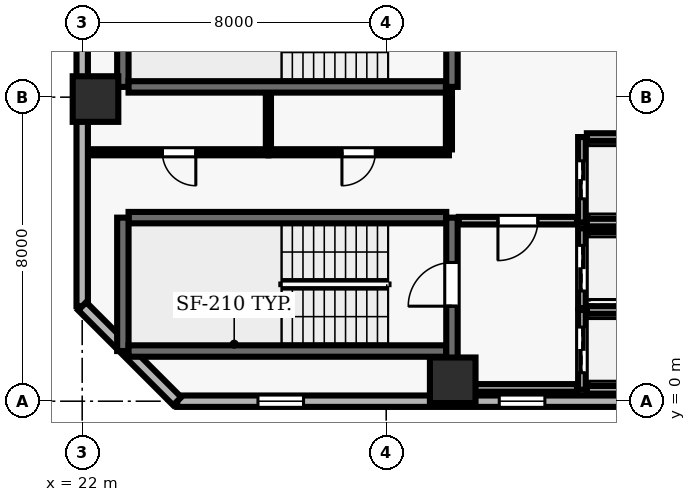
"""IFC4 building model, lengths in metres.
Left out: names, types, materials, properties, quantities, classifications, styles, units other than length and angle.
Written with IfcOpenShell. Run it as: python <this file> out.ifc"""

import sys

from ifc_helpers import new_model, si_unit, direction, frame, frame_2d, origin, origin_2d, place, context, subcontext, project, spatial, rectangle, extrude, element, fill, save


model = new_model("IFC4")
c1 = context("Model", 3, precision=1e-05, world=origin(), true_north=direction((0.0, 1.0)))
c2 = subcontext(c1, "Body", "Model", "MODEL_VIEW")
j1 = project(units=[si_unit("LENGTHUNIT", "METRE"), si_unit("PLANEANGLEUNIT", "RADIAN")], contexts=[c1])
p1 = place(None, origin())
s1 = spatial("IfcSite", under=j1, at=p1, CompositionType="ELEMENT")
p2 = place(p1, origin())
s2 = spatial("IfcBuilding", under=s1, at=p2, CompositionType="ELEMENT")
p3 = place(p2, frame((0.0, 0.0, 103.4)))
s3 = spatial("IfcBuildingStorey", under=s2, at=p3, CompositionType="ELEMENT", Elevation=103.4)
for number, where, z_axis, x_axis in (
    (1, (31.75, 0.55, 0.0), (0.0, 0.0, 1.0), (1.0, 0.0, 0.0)),
    (2, (22.35, 7.95, 0.0), (0.0, 0.0, 1.0), (1.0, 0.0, 0.0)),
):
    element("IfcColumn", number, at=place(p3, frame(where, z_axis=z_axis, x_axis=x_axis)), inside=s3, PredefinedType="COLUMN", context=c2, shape_type="SweptSolid", body=[
        extrude(rectangle(XDim=1.2, YDim=1.2, at=origin_2d()), origin(), (0.0, 0.0, 1.0), 3.9),
    ])
p4 = place(p3, frame((24.5, 0.0, 0.0), z_axis=(0.0, 0.0, 1.0), x_axis=(1.0, 0.0, 0.0)))
e3 = element("IfcWall", 3, at=p4, inside=s3, PredefinedType="SOLIDWALL", context=c2, shape_type="SweptSolid", body=[
    extrude(rectangle(XDim=43.6, YDim=0.3, at=frame_2d((21.8, 0.0))), origin(), (0.0, 0.0, 1.0), 3.69),
])
p5 = place(p4, frame((2.125, 0.0, 0.9)))
e4 = element("IfcOpeningElement", 4, at=p5, cuts=e3, PredefinedType="OPENING", context=c2, shape_type="SweptSolid", body=[
    extrude(rectangle(XDim=1.2, YDim=1.6, at=frame_2d((0.6, 0.8))), frame((0.0, 0.16, 0.0), z_axis=(0.0, -1.0, 0.0), x_axis=(1.0, 0.0, 0.0)), (0.0, 0.0, 1.0), 0.32),
])
p6 = place(p4, frame((8.475, 0.0, 0.9)))
e5 = element("IfcOpeningElement", 5, at=p6, cuts=e3, PredefinedType="OPENING", context=c2, shape_type="SweptSolid", body=[
    extrude(rectangle(XDim=1.2, YDim=1.6, at=frame_2d((0.6, 0.8))), frame((0.0, 0.16, 0.0), z_axis=(0.0, -1.0, 0.0), x_axis=(1.0, 0.0, 0.0)), (0.0, 0.0, 1.0), 0.32),
])
p7 = place(p4, frame((18.475, 0.0, 0.9)))
e6 = element("IfcOpeningElement", 6, at=p7, cuts=e3, PredefinedType="OPENING", context=c2, shape_type="SweptSolid", body=[
    extrude(rectangle(XDim=1.2, YDim=1.6, at=frame_2d((0.6, 0.8))), frame((0.0, 0.16, 0.0), z_axis=(0.0, -1.0, 0.0), x_axis=(1.0, 0.0, 0.0)), (0.0, 0.0, 1.0), 0.32),
])
p8 = place(p4, frame((23.925, 0.0, 0.9)))
e7 = element("IfcOpeningElement", 7, at=p8, cuts=e3, PredefinedType="OPENING", context=c2, shape_type="SweptSolid", body=[
    extrude(rectangle(XDim=1.2, YDim=1.6, at=frame_2d((0.6, 0.8))), frame((0.0, 0.16, 0.0), z_axis=(0.0, -1.0, 0.0), x_axis=(1.0, 0.0, 0.0)), (0.0, 0.0, 1.0), 0.32),
])
p9 = place(p4, frame((29.375, 0.0, 0.9)))
e8 = element("IfcOpeningElement", 8, at=p9, cuts=e3, PredefinedType="OPENING", context=c2, shape_type="SweptSolid", body=[
    extrude(rectangle(XDim=1.2, YDim=1.6, at=frame_2d((0.6, 0.8))), frame((0.0, 0.16, 0.0), z_axis=(0.0, -1.0, 0.0), x_axis=(1.0, 0.0, 0.0)), (0.0, 0.0, 1.0), 0.32),
])
p10 = place(p4, frame((33.925, 0.0, 0.9)))
e9 = element("IfcOpeningElement", 9, at=p10, cuts=e3, PredefinedType="OPENING", context=c2, shape_type="SweptSolid", body=[
    extrude(rectangle(XDim=1.2, YDim=1.6, at=frame_2d((0.6, 0.8))), frame((0.0, 0.16, 0.0), z_axis=(0.0, -1.0, 0.0), x_axis=(1.0, 0.0, 0.0)), (0.0, 0.0, 1.0), 0.32),
])
p11 = place(p4, frame((40.275, 0.0, 0.9)))
e10 = element("IfcOpeningElement", 10, at=p11, cuts=e3, PredefinedType="OPENING", context=c2, shape_type="SweptSolid", body=[
    extrude(rectangle(XDim=1.2, YDim=1.6, at=frame_2d((0.6, 0.8))), frame((0.0, 0.16, 0.0), z_axis=(0.0, -1.0, 0.0), x_axis=(1.0, 0.0, 0.0)), (0.0, 0.0, 1.0), 0.32),
])
p12 = place(p3, frame((22.0, 46.1, 0.0), z_axis=(0.0, 0.0, 1.0), x_axis=(0.0, -1.0, 0.0)))
e11 = element("IfcWall", 11, at=p12, inside=s3, PredefinedType="SOLIDWALL", context=c2, shape_type="SweptSolid", body=[
    extrude(rectangle(XDim=43.6, YDim=0.3, at=frame_2d((21.8, 0.0))), origin(), (0.0, 0.0, 1.0), 3.69),
])
p13 = place(p12, frame((7.1, 0.0, 0.0)))
e12 = element("IfcOpeningElement", 12, at=p13, cuts=e11, PredefinedType="OPENING", context=c2, shape_type="SweptSolid", body=[
    extrude(rectangle(XDim=1.0, YDim=2.2, at=frame_2d((0.5, 1.1))), frame((0.0, 0.16, 0.0), z_axis=(0.0, -1.0, 0.0), x_axis=(1.0, 0.0, 0.0)), (0.0, 0.0, 1.0), 0.32),
])
p14 = place(p12, frame((2.125, 0.0, 0.9)))
e13 = element("IfcOpeningElement", 13, at=p14, cuts=e11, PredefinedType="OPENING", context=c2, shape_type="SweptSolid", body=[
    extrude(rectangle(XDim=1.2, YDim=1.6, at=frame_2d((0.6, 0.8))), frame((0.0, 0.16, 0.0), z_axis=(0.0, -1.0, 0.0), x_axis=(1.0, 0.0, 0.0)), (0.0, 0.0, 1.0), 0.32),
])
p15 = place(p12, frame((8.475, 0.0, 0.9)))
e14 = element("IfcOpeningElement", 14, at=p15, cuts=e11, PredefinedType="OPENING", context=c2, shape_type="SweptSolid", body=[
    extrude(rectangle(XDim=1.2, YDim=1.6, at=frame_2d((0.6, 0.8))), frame((0.0, 0.16, 0.0), z_axis=(0.0, -1.0, 0.0), x_axis=(1.0, 0.0, 0.0)), (0.0, 0.0, 1.0), 0.32),
])
p16 = place(p12, frame((13.025, 0.0, 0.9)))
e15 = element("IfcOpeningElement", 15, at=p16, cuts=e11, PredefinedType="OPENING", context=c2, shape_type="SweptSolid", body=[
    extrude(rectangle(XDim=1.2, YDim=1.6, at=frame_2d((0.6, 0.8))), frame((0.0, 0.16, 0.0), z_axis=(0.0, -1.0, 0.0), x_axis=(1.0, 0.0, 0.0)), (0.0, 0.0, 1.0), 0.32),
])
p17 = place(p12, frame((18.025, 0.0, 0.9)))
e16 = element("IfcOpeningElement", 16, at=p17, cuts=e11, PredefinedType="OPENING", context=c2, shape_type="SweptSolid", body=[
    extrude(rectangle(XDim=1.2, YDim=1.6, at=frame_2d((0.6, 0.8))), frame((0.0, 0.16, 0.0), z_axis=(0.0, -1.0, 0.0), x_axis=(1.0, 0.0, 0.0)), (0.0, 0.0, 1.0), 0.32),
])
p18 = place(p12, frame((23.925, 0.0, 0.9)))
e17 = element("IfcOpeningElement", 17, at=p18, cuts=e11, PredefinedType="OPENING", context=c2, shape_type="SweptSolid", body=[
    extrude(rectangle(XDim=1.2, YDim=1.6, at=frame_2d((0.6, 0.8))), frame((0.0, 0.16, 0.0), z_axis=(0.0, -1.0, 0.0), x_axis=(1.0, 0.0, 0.0)), (0.0, 0.0, 1.0), 0.32),
])
p19 = place(p12, frame((29.375, 0.0, 0.9)))
e18 = element("IfcOpeningElement", 18, at=p19, cuts=e11, PredefinedType="OPENING", context=c2, shape_type="SweptSolid", body=[
    extrude(rectangle(XDim=1.2, YDim=1.6, at=frame_2d((0.6, 0.8))), frame((0.0, 0.16, 0.0), z_axis=(0.0, -1.0, 0.0), x_axis=(1.0, 0.0, 0.0)), (0.0, 0.0, 1.0), 0.32),
])
p20 = place(p12, frame((34.825, 0.0, 0.9)))
e19 = element("IfcOpeningElement", 19, at=p20, cuts=e11, PredefinedType="OPENING", context=c2, shape_type="SweptSolid", body=[
    extrude(rectangle(XDim=1.2, YDim=1.6, at=frame_2d((0.6, 0.8))), frame((0.0, 0.16, 0.0), z_axis=(0.0, -1.0, 0.0), x_axis=(1.0, 0.0, 0.0)), (0.0, 0.0, 1.0), 0.32),
])
p21 = place(p3, frame((22.0, 2.5, 0.0), z_axis=(0.0, 0.0, 1.0), x_axis=(0.707106781187, -0.707106781187, 0.0)))
e20 = element("IfcWall", 20, at=p21, inside=s3, PredefinedType="SOLIDWALL", context=c2, shape_type="SweptSolid", body=[
    extrude(rectangle(XDim=3.536, YDim=0.3, at=frame_2d((1.768, 0.0))), origin(), (0.0, 0.0, 1.0), 3.69),
])
p22 = place(p3, frame((31.58, 4.83, 0.0), z_axis=(0.0, 0.0, 1.0), x_axis=(-1.0, 0.0, 0.0)))
e21 = element("IfcWall", 21, at=p22, inside=s3, PredefinedType="SHEAR", context=c2, shape_type="SweptSolid", body=[
    extrude(rectangle(XDim=8.36, YDim=0.3, at=frame_2d((4.18, 0.0))), origin(), (0.0, 0.0, 1.0), 3.69),
])
p23 = place(p3, frame((23.07, 4.83, 0.0), z_axis=(0.0, 0.0, 1.0), x_axis=(0.0, -1.0, 0.0)))
e22 = element("IfcWall", 22, at=p23, inside=s3, PredefinedType="SHEAR", context=c2, shape_type="SweptSolid", body=[
    extrude(rectangle(XDim=3.51, YDim=0.3, at=frame_2d((1.755, 0.0))), origin(), (0.0, 0.0, 1.0), 3.69),
])
p24 = place(p3, frame((23.22, 1.32, 0.0), z_axis=(0.0, 0.0, 1.0), x_axis=(1.0, 0.0, 0.0)))
e23 = element("IfcWall", 23, at=p24, inside=s3, PredefinedType="SHEAR", context=c2, shape_type="SweptSolid", body=[
    extrude(rectangle(XDim=8.36, YDim=0.3, at=frame_2d((4.18, 0.0))), origin(), (0.0, 0.0, 1.0), 3.69),
])
p25 = place(p3, frame((31.73, 0.96, 0.0), z_axis=(0.0, 0.0, 1.0), x_axis=(0.0, 1.0, 0.0)))
e24 = element("IfcWall", 24, at=p25, inside=s3, PredefinedType="SHEAR", context=c2, shape_type="SweptSolid", body=[
    extrude(rectangle(XDim=3.87, YDim=0.3, at=frame_2d((1.935, 0.0))), origin(), (0.0, 0.0, 1.0), 3.69),
])
p26 = place(p25, frame((1.54, 0.0, 0.0)))
e25 = element("IfcOpeningElement", 25, at=p26, cuts=e24, PredefinedType="OPENING", context=c2, shape_type="SweptSolid", body=[
    extrude(rectangle(XDim=1.15, YDim=2.15, at=frame_2d((0.575, 1.075))), frame((0.0, 0.16, 0.0), z_axis=(0.0, -1.0, 0.0), x_axis=(1.0, 0.0, 0.0)), (0.0, 0.0, 1.0), 0.32),
])
p27 = place(p3, frame((23.07, 11.78, 0.0), z_axis=(0.0, 0.0, 1.0), x_axis=(0.0, -1.0, 0.0)))
e26 = element("IfcWall", 26, at=p27, inside=s3, PredefinedType="SHEAR", context=c2, shape_type="SweptSolid", body=[
    extrude(rectangle(XDim=3.51, YDim=0.3, at=frame_2d((1.755, 0.0))), origin(), (0.0, 0.0, 1.0), 3.69),
])
p28 = place(p3, frame((23.22, 8.27, 0.0), z_axis=(0.0, 0.0, 1.0), x_axis=(1.0, 0.0, 0.0)))
e27 = element("IfcWall", 27, at=p28, inside=s3, PredefinedType="SHEAR", context=c2, shape_type="SweptSolid", body=[
    extrude(rectangle(XDim=8.36, YDim=0.3, at=frame_2d((4.18, 0.0))), origin(), (0.0, 0.0, 1.0), 3.69),
])
p29 = place(p3, frame((31.73, 8.27, 0.0), z_axis=(0.0, 0.0, 1.0), x_axis=(0.0, 1.0, 0.0)))
e28 = element("IfcWall", 28, at=p29, inside=s3, PredefinedType="SHEAR", context=c2, shape_type="SweptSolid", body=[
    extrude(rectangle(XDim=3.51, YDim=0.3, at=frame_2d((1.755, 0.0))), origin(), (0.0, 0.0, 1.0), 3.69),
])
p30 = place(p29, frame((1.18, 0.0, 0.0)))
e29 = element("IfcOpeningElement", 29, at=p30, cuts=e28, PredefinedType="OPENING", context=c2, shape_type="SweptSolid", body=[
    extrude(rectangle(XDim=1.15, YDim=2.15, at=frame_2d((0.575, 1.075))), frame((0.0, 0.16, 0.0), z_axis=(0.0, -1.0, 0.0), x_axis=(1.0, 0.0, 0.0)), (0.0, 0.0, 1.0), 0.32),
])
p31 = place(p3, frame((35.15, 2.4, 0.0), z_axis=(0.0, 0.0, 1.0), x_axis=(0.0, -1.0, 0.0)))
e30 = element("IfcWall", 30, at=p31, inside=s3, PredefinedType="SOLIDWALL", context=c2, shape_type="SweptSolid", body=[
    extrude(rectangle(XDim=2.1, YDim=0.2, at=frame_2d((1.05, 0.0))), origin(), (0.0, 0.0, 1.0), 3.69),
])
p32 = place(p31, frame((0.45, 0.0, 0.0)))
e31 = element("IfcOpeningElement", 31, at=p32, cuts=e30, PredefinedType="OPENING", context=c2, shape_type="SweptSolid", body=[
    extrude(rectangle(XDim=1.2, YDim=2.15, at=frame_2d((0.6, 1.075))), frame((0.0, 0.11, 0.0), z_axis=(0.0, -1.0, 0.0), x_axis=(1.0, 0.0, 0.0)), (0.0, 0.0, 1.0), 0.22),
])
for number, where, z_axis, x_axis in (
    (32, (35.28, 0.3, 0.0), (0.0, 0.0, 1.0), (1.0, 0.0, 0.0)),
    (33, (37.42, 2.4, 0.0), (0.0, 0.0, 1.0), (-1.0, 0.0, 0.0)),
):
    element("IfcWall", number, at=place(p3, frame(where, z_axis=z_axis, x_axis=x_axis)), inside=s3, PredefinedType="SOLIDWALL", context=c2, shape_type="SweptSolid", body=[
        extrude(rectangle(XDim=2.14, YDim=0.2, at=frame_2d((1.07, 0.0))), origin(), (0.0, 0.0, 1.0), 3.69),
    ])
p33 = place(p3, frame((35.15, 4.55, 0.0), z_axis=(0.0, 0.0, 1.0), x_axis=(0.0, -1.0, 0.0)))
e34 = element("IfcWall", 34, at=p33, inside=s3, PredefinedType="SOLIDWALL", context=c2, shape_type="SweptSolid", body=[
    extrude(rectangle(XDim=2.1, YDim=0.2, at=frame_2d((1.05, 0.0))), origin(), (0.0, 0.0, 1.0), 3.69),
])
p34 = place(p33, frame((0.45, 0.0, 0.0)))
e35 = element("IfcOpeningElement", 35, at=p34, cuts=e34, PredefinedType="OPENING", context=c2, shape_type="SweptSolid", body=[
    extrude(rectangle(XDim=1.2, YDim=2.15, at=frame_2d((0.6, 1.075))), frame((0.0, 0.11, 0.0), z_axis=(0.0, -1.0, 0.0), x_axis=(1.0, 0.0, 0.0)), (0.0, 0.0, 1.0), 0.22),
])
p35 = place(p3, frame((37.42, 4.55, 0.0), z_axis=(0.0, 0.0, 1.0), x_axis=(-1.0, 0.0, 0.0)))
e36 = element("IfcWall", 36, at=p35, inside=s3, PredefinedType="SOLIDWALL", context=c2, shape_type="SweptSolid", body=[
    extrude(rectangle(XDim=2.14, YDim=0.2, at=frame_2d((1.07, 0.0))), origin(), (0.0, 0.0, 1.0), 3.69),
])
p36 = place(p3, frame((35.15, 6.95, 0.0), z_axis=(0.0, 0.0, 1.0), x_axis=(0.0, -1.0, 0.0)))
e37 = element("IfcWall", 37, at=p36, inside=s3, PredefinedType="SOLIDWALL", context=c2, shape_type="SweptSolid", body=[
    extrude(rectangle(XDim=2.25, YDim=0.2, at=frame_2d((1.125, 0.0))), origin(), (0.0, 0.0, 1.0), 3.69),
])
p37 = place(p36, frame((0.625, 0.0, 0.0)))
e38 = element("IfcOpeningElement", 38, at=p37, cuts=e37, PredefinedType="OPENING", context=c2, shape_type="SweptSolid", body=[
    extrude(rectangle(XDim=1.0, YDim=2.1, at=frame_2d((0.5, 1.05))), frame((0.0, 0.11, 0.0), z_axis=(0.0, -1.0, 0.0), x_axis=(1.0, 0.0, 0.0)), (0.0, 0.0, 1.0), 0.22),
])
for number, where, z_axis, x_axis in (
    (39, (35.28, 4.7, 0.0), (0.0, 0.0, 1.0), (1.0, 0.0, 0.0)),
    (40, (37.42, 6.95, 0.0), (0.0, 0.0, 1.0), (-1.0, 0.0, 0.0)),
):
    element("IfcWall", number, at=place(p3, frame(where, z_axis=z_axis, x_axis=x_axis)), inside=s3, PredefinedType="SOLIDWALL", context=c2, shape_type="SweptSolid", body=[
        extrude(rectangle(XDim=2.14, YDim=0.2, at=frame_2d((1.07, 0.0))), origin(), (0.0, 0.0, 1.0), 3.69),
    ])
p38 = place(p3, frame((26.9, 6.55, 0.0), z_axis=(0.0, 0.0, 1.0), x_axis=(-1.0, 0.0, 0.0)))
e41 = element("IfcWall", 41, at=p38, inside=s3, PredefinedType="PARTITIONING", context=c2, shape_type="SweptSolid", body=[
    extrude(rectangle(XDim=4.7, YDim=0.16, at=frame_2d((2.35, 0.0))), origin(), (0.0, 0.0, 1.0), 3.69),
])
p39 = place(p38, frame((1.91, 0.0, 0.0)))
e42 = element("IfcOpeningElement", 42, at=p39, cuts=e41, PredefinedType="OPENING", context=c2, shape_type="SweptSolid", body=[
    extrude(rectangle(XDim=0.88, YDim=2.1, at=frame_2d((0.44, 1.05))), frame((0.0, 0.09, 0.0), z_axis=(0.0, -1.0, 0.0), x_axis=(1.0, 0.0, 0.0)), (0.0, 0.0, 1.0), 0.18),
])
p40 = place(p3, frame((31.65, 0.35, 0.0), z_axis=(0.0, 0.0, 1.0), x_axis=(1.0, 0.0, 0.0)))
e43 = element("IfcWall", 43, at=p40, inside=s3, PredefinedType="SOLIDWALL", context=c2, shape_type="SweptSolid", body=[
    extrude(rectangle(XDim=3.37, YDim=0.2, at=frame_2d((1.685, 0.0))), origin(), (0.0, 0.0, 1.0), 3.69),
])
p41 = place(p3, frame((31.65, 6.55, 0.0), z_axis=(0.0, 0.0, 1.0), x_axis=(-1.0, 0.0, 0.0)))
e44 = element("IfcWall", 44, at=p41, inside=s3, PredefinedType="PARTITIONING", context=c2, shape_type="SweptSolid", body=[
    extrude(rectangle(XDim=4.75, YDim=0.16, at=frame_2d((2.375, 0.0))), origin(), (0.0, 0.0, 1.0), 3.69),
])
p42 = place(p41, frame((1.935, 0.0, 0.0)))
e45 = element("IfcOpeningElement", 45, at=p42, cuts=e44, PredefinedType="OPENING", context=c2, shape_type="SweptSolid", body=[
    extrude(rectangle(XDim=0.88, YDim=2.1, at=frame_2d((0.44, 1.05))), frame((0.0, 0.09, 0.0), z_axis=(0.0, -1.0, 0.0), x_axis=(1.0, 0.0, 0.0)), (0.0, 0.0, 1.0), 0.18),
])
p43 = place(p3, frame((35.02, 4.75, 0.0), z_axis=(0.0, 0.0, 1.0), x_axis=(-1.0, 0.0, 0.0)))
e46 = element("IfcWall", 46, at=p43, inside=s3, PredefinedType="SOLIDWALL", context=c2, shape_type="SweptSolid", body=[
    extrude(rectangle(XDim=3.11, YDim=0.2, at=frame_2d((1.555, 0.0))), origin(), (0.0, 0.0, 1.0), 3.69),
])
p44 = place(p43, frame((1.03, 0.0, 0.0)))
e47 = element("IfcOpeningElement", 47, at=p44, cuts=e46, PredefinedType="OPENING", context=c2, shape_type="SweptSolid", body=[
    extrude(rectangle(XDim=1.05, YDim=2.15, at=frame_2d((0.525, 1.075))), frame((0.0, 0.11, 0.0), z_axis=(0.0, -1.0, 0.0), x_axis=(1.0, 0.0, 0.0)), (0.0, 0.0, 1.0), 0.22),
])
p45 = place(p3, frame((26.9, 6.625, 0.0), z_axis=(0.0, 0.0, 1.0), x_axis=(0.0, 1.0, 0.0)))
e48 = element("IfcWall", 48, at=p45, inside=s3, PredefinedType="PARTITIONING", context=c2, shape_type="SweptSolid", body=[
    extrude(rectangle(XDim=1.465, YDim=0.135, at=frame_2d((0.732, 0.0))), origin(), (0.0, 0.0, 1.0), 3.69),
])
p46 = place(p3, frame((31.65, 8.24, 0.0), z_axis=(0.0, 0.0, 1.0), x_axis=(0.0, -1.0, 0.0)))
e49 = element("IfcWall", 49, at=p46, inside=s3, PredefinedType="PARTITIONING", context=c2, shape_type="SweptSolid", body=[
    extrude(rectangle(XDim=1.615, YDim=0.16, at=frame_2d((0.808, 0.0))), origin(), (0.0, 0.0, 1.0), 3.69),
])
p47 = place(p5, origin())
e50 = element("IfcWindow", 50, at=p47, inside=s3, PartitioningType="SINGLE_PANEL", PredefinedType="WINDOW", context=c2, shape_type="SweptSolid", body=[
    extrude(rectangle(XDim=1.2, YDim=1.6, at=frame_2d((0.6, 0.8))), frame((0.0, 0.03, 0.0), z_axis=(0.0, -1.0, 0.0), x_axis=(1.0, 0.0, 0.0)), (0.0, 0.0, 1.0), 0.06),
])
fill(e4, e50)
p48 = place(p6, origin())
e51 = element("IfcWindow", 51, at=p48, inside=s3, PartitioningType="SINGLE_PANEL", PredefinedType="WINDOW", context=c2, shape_type="SweptSolid", body=[
    extrude(rectangle(XDim=1.2, YDim=1.6, at=frame_2d((0.6, 0.8))), frame((0.0, 0.03, 0.0), z_axis=(0.0, -1.0, 0.0), x_axis=(1.0, 0.0, 0.0)), (0.0, 0.0, 1.0), 0.06),
])
fill(e5, e51)
p49 = place(p26, origin())
e52 = element("IfcDoor", 52, at=p49, inside=s3, OperationType="SINGLE_SWING_LEFT", PredefinedType="DOOR", context=c2, shape_type="SweptSolid", body=[
    extrude(rectangle(XDim=1.15, YDim=2.15, at=frame_2d((0.575, 1.075))), frame((0.0, 0.025, 0.0), z_axis=(0.0, -1.0, 0.0), x_axis=(1.0, 0.0, 0.0)), (0.0, 0.0, 1.0), 0.05),
])
fill(e25, e52)
p50 = place(p32, origin())
e53 = element("IfcDoor", 53, at=p50, inside=s3, OperationType="DOUBLE_DOOR_SLIDING", PredefinedType="DOOR", context=c2, shape_type="SweptSolid", body=[
    extrude(rectangle(XDim=1.2, YDim=2.15, at=frame_2d((0.6, 1.075))), frame((0.0, 0.025, 0.0), z_axis=(0.0, -1.0, 0.0), x_axis=(1.0, 0.0, 0.0)), (0.0, 0.0, 1.0), 0.05),
])
fill(e31, e53)
p51 = place(p34, origin())
e54 = element("IfcDoor", 54, at=p51, inside=s3, OperationType="DOUBLE_DOOR_SLIDING", PredefinedType="DOOR", context=c2, shape_type="SweptSolid", body=[
    extrude(rectangle(XDim=1.2, YDim=2.15, at=frame_2d((0.6, 1.075))), frame((0.0, 0.025, 0.0), z_axis=(0.0, -1.0, 0.0), x_axis=(1.0, 0.0, 0.0)), (0.0, 0.0, 1.0), 0.05),
])
fill(e35, e54)
p52 = place(p37, origin())
e55 = element("IfcDoor", 55, at=p52, inside=s3, OperationType="DOUBLE_DOOR_SLIDING", PredefinedType="DOOR", context=c2, shape_type="SweptSolid", body=[
    extrude(rectangle(XDim=1.0, YDim=2.1, at=frame_2d((0.5, 1.05))), frame((0.0, 0.025, 0.0), z_axis=(0.0, -1.0, 0.0), x_axis=(1.0, 0.0, 0.0)), (0.0, 0.0, 1.0), 0.05),
])
fill(e38, e55)
p53 = place(p44, origin())
e56 = element("IfcDoor", 56, at=p53, inside=s3, OperationType="SINGLE_SWING_RIGHT", PredefinedType="DOOR", context=c2, shape_type="SweptSolid", body=[
    extrude(rectangle(XDim=1.05, YDim=2.15, at=frame_2d((0.525, 1.075))), frame((0.0, 0.025, 0.0), z_axis=(0.0, -1.0, 0.0), x_axis=(1.0, 0.0, 0.0)), (0.0, 0.0, 1.0), 0.05),
])
fill(e47, e56)
p54 = place(p39, origin())
e57 = element("IfcDoor", 57, at=p54, inside=s3, OperationType="SINGLE_SWING_LEFT", PredefinedType="DOOR", context=c2, shape_type="SweptSolid", body=[
    extrude(rectangle(XDim=0.88, YDim=2.1, at=frame_2d((0.44, 1.05))), frame((0.0, 0.025, 0.0), z_axis=(0.0, -1.0, 0.0), x_axis=(1.0, 0.0, 0.0)), (0.0, 0.0, 1.0), 0.05),
])
fill(e42, e57)
p55 = place(p42, origin())
e58 = element("IfcDoor", 58, at=p55, inside=s3, OperationType="SINGLE_SWING_RIGHT", PredefinedType="DOOR", context=c2, shape_type="SweptSolid", body=[
    extrude(rectangle(XDim=0.88, YDim=2.1, at=frame_2d((0.44, 1.05))), frame((0.0, 0.025, 0.0), z_axis=(0.0, -1.0, 0.0), x_axis=(1.0, 0.0, 0.0)), (0.0, 0.0, 1.0), 0.05),
])
fill(e45, e58)
save(model, sys.argv[1])
